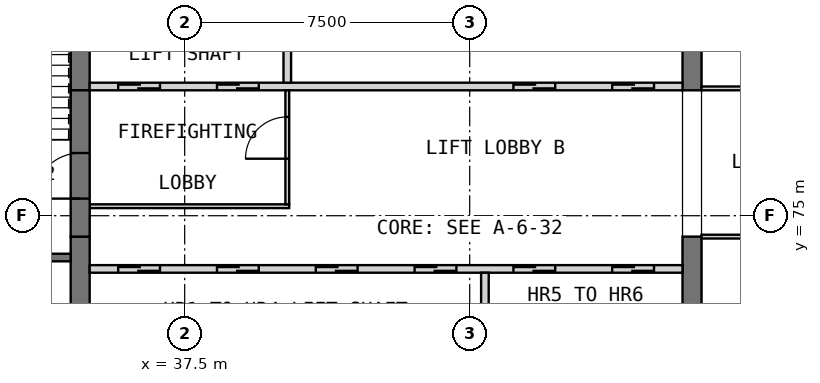
"""IFC4 building model, lengths in metres.
Left out: names, types, materials, properties, quantities, classifications, styles, units other than length and angle.
Written with IfcOpenShell. Run it as: python <this file> out.ifc"""

import sys

from ifc_helpers import new_model, si_unit, direction, frame, frame_2d, origin, place, context, subcontext, project, spatial, rectangle, extrude, element, fill, save


model = new_model("IFC4")
c1 = context("Model", 3, precision=1e-05, world=origin(), true_north=direction((0.0, 1.0)))
c2 = subcontext(c1, "Body", "Model", "MODEL_VIEW")
j1 = project(units=[si_unit("LENGTHUNIT", "METRE"), si_unit("PLANEANGLEUNIT", "RADIAN")], contexts=[c1])
p1 = place(None, origin())
s1 = spatial("IfcSite", under=j1, at=p1, CompositionType="ELEMENT")
p2 = place(p1, origin())
s2 = spatial("IfcBuilding", under=s1, at=p2, CompositionType="ELEMENT")
p3 = place(p2, frame((0.0, 0.0, 254.7)))
s3 = spatial("IfcBuildingStorey", under=s2, at=p3, CompositionType="ELEMENT", Elevation=254.7)
p4 = place(p3, frame((34.75, 68.05, 0.0), z_axis=(0.0, 0.0, 1.0), x_axis=(0.0, 1.0, 0.0)))
e1 = element("IfcWall", 1, at=p4, inside=s3, PredefinedType="SHEAR", context=c2, shape_type="SweptSolid", body=[
    extrude(rectangle(XDim=6.4, YDim=0.5, at=frame_2d((3.2, 0.0))), origin(), (0.0, 0.0, 1.0), 3.5),
])
p5 = place(p3, frame((34.75, 78.3, 0.0), z_axis=(0.0, 0.0, 1.0), x_axis=(0.0, 1.0, 0.0)))
e2 = element("IfcWall", 2, at=p5, inside=s3, PredefinedType="SHEAR", context=c2, shape_type="SweptSolid", body=[
    extrude(rectangle(XDim=3.6, YDim=0.5, at=frame_2d((1.8, 0.0))), origin(), (0.0, 0.0, 1.0), 3.5),
])
p6 = place(p3, frame((50.85, 68.05, 0.0), z_axis=(0.0, 0.0, 1.0), x_axis=(0.0, 1.0, 0.0)))
e3 = element("IfcWall", 3, at=p6, inside=s3, PredefinedType="SHEAR", context=c2, shape_type="SweptSolid", body=[
    extrude(rectangle(XDim=6.4, YDim=0.5, at=frame_2d((3.2, 0.0))), origin(), (0.0, 0.0, 1.0), 3.5),
])
p7 = place(p3, frame((50.85, 78.3, 0.0), z_axis=(0.0, 0.0, 1.0), x_axis=(0.0, 1.0, 0.0)))
e4 = element("IfcWall", 4, at=p7, inside=s3, PredefinedType="SHEAR", context=c2, shape_type="SweptSolid", body=[
    extrude(rectangle(XDim=3.6, YDim=0.5, at=frame_2d((1.8, 0.0))), origin(), (0.0, 0.0, 1.0), 3.5),
])
p8 = place(p3, frame((35.0, 73.6, 0.0), z_axis=(0.0, 0.0, 1.0), x_axis=(1.0, 0.0, 0.0)))
e5 = element("IfcWall", 5, at=p8, inside=s3, PredefinedType="SOLIDWALL", context=c2, shape_type="SweptSolid", body=[
    extrude(rectangle(XDim=15.6, YDim=0.2, at=frame_2d((7.8, 0.0))), origin(), (0.0, 0.0, 1.0), 3.5),
])
p9 = place(p8, frame((0.75, 0.0, 0.0)))
e6 = element("IfcOpeningElement", 6, at=p9, cuts=e5, PredefinedType="OPENING", context=c2, shape_type="SweptSolid", body=[
    extrude(rectangle(XDim=1.1, YDim=2.1, at=frame_2d((0.55, 1.05))), frame((0.0, 0.11, 0.0), z_axis=(0.0, -1.0, 0.0), x_axis=(1.0, 0.0, 0.0)), (0.0, 0.0, 1.0), 0.22),
])
p10 = place(p8, frame((3.35, 0.0, 0.0)))
e7 = element("IfcOpeningElement", 7, at=p10, cuts=e5, PredefinedType="OPENING", context=c2, shape_type="SweptSolid", body=[
    extrude(rectangle(XDim=1.1, YDim=2.1, at=frame_2d((0.55, 1.05))), frame((0.0, 0.11, 0.0), z_axis=(0.0, -1.0, 0.0), x_axis=(1.0, 0.0, 0.0)), (0.0, 0.0, 1.0), 0.22),
])
p11 = place(p8, frame((5.95, 0.0, 0.0)))
e8 = element("IfcOpeningElement", 8, at=p11, cuts=e5, PredefinedType="OPENING", context=c2, shape_type="SweptSolid", body=[
    extrude(rectangle(XDim=1.1, YDim=2.1, at=frame_2d((0.55, 1.05))), frame((0.0, 0.11, 0.0), z_axis=(0.0, -1.0, 0.0), x_axis=(1.0, 0.0, 0.0)), (0.0, 0.0, 1.0), 0.22),
])
p12 = place(p8, frame((8.55, 0.0, 0.0)))
e9 = element("IfcOpeningElement", 9, at=p12, cuts=e5, PredefinedType="OPENING", context=c2, shape_type="SweptSolid", body=[
    extrude(rectangle(XDim=1.1, YDim=2.1, at=frame_2d((0.55, 1.05))), frame((0.0, 0.11, 0.0), z_axis=(0.0, -1.0, 0.0), x_axis=(1.0, 0.0, 0.0)), (0.0, 0.0, 1.0), 0.22),
])
p13 = place(p8, frame((11.15, 0.0, 0.0)))
e10 = element("IfcOpeningElement", 10, at=p13, cuts=e5, PredefinedType="OPENING", context=c2, shape_type="SweptSolid", body=[
    extrude(rectangle(XDim=1.1, YDim=2.1, at=frame_2d((0.55, 1.05))), frame((0.0, 0.11, 0.0), z_axis=(0.0, -1.0, 0.0), x_axis=(1.0, 0.0, 0.0)), (0.0, 0.0, 1.0), 0.22),
])
p14 = place(p8, frame((13.75, 0.0, 0.0)))
e11 = element("IfcOpeningElement", 11, at=p14, cuts=e5, PredefinedType="OPENING", context=c2, shape_type="SweptSolid", body=[
    extrude(rectangle(XDim=1.1, YDim=2.1, at=frame_2d((0.55, 1.05))), frame((0.0, 0.11, 0.0), z_axis=(0.0, -1.0, 0.0), x_axis=(1.0, 0.0, 0.0)), (0.0, 0.0, 1.0), 0.22),
])
p15 = place(p3, frame((45.4, 71.5, 0.0), z_axis=(0.0, 0.0, 1.0), x_axis=(0.0, 1.0, 0.0)))
e12 = element("IfcWall", 12, at=p15, inside=s3, PredefinedType="SOLIDWALL", context=c2, shape_type="SweptSolid", body=[
    extrude(rectangle(XDim=2.0, YDim=0.2, at=frame_2d((1.0, 0.0))), origin(), (0.0, 0.0, 1.0), 3.5),
])
p16 = place(p3, frame((35.0, 78.4, 0.0), z_axis=(0.0, 0.0, 1.0), x_axis=(1.0, 0.0, 0.0)))
e13 = element("IfcWall", 13, at=p16, inside=s3, PredefinedType="SOLIDWALL", context=c2, shape_type="SweptSolid", body=[
    extrude(rectangle(XDim=15.6, YDim=0.2, at=frame_2d((7.8, 0.0))), origin(), (0.0, 0.0, 1.0), 3.5),
])
p17 = place(p16, frame((0.75, 0.0, 0.0)))
e14 = element("IfcOpeningElement", 14, at=p17, cuts=e13, PredefinedType="OPENING", context=c2, shape_type="SweptSolid", body=[
    extrude(rectangle(XDim=1.1, YDim=2.1, at=frame_2d((0.55, 1.05))), frame((0.0, 0.11, 0.0), z_axis=(0.0, -1.0, 0.0), x_axis=(1.0, 0.0, 0.0)), (0.0, 0.0, 1.0), 0.22),
])
p18 = place(p16, frame((3.35, 0.0, 0.0)))
e15 = element("IfcOpeningElement", 15, at=p18, cuts=e13, PredefinedType="OPENING", context=c2, shape_type="SweptSolid", body=[
    extrude(rectangle(XDim=1.1, YDim=2.1, at=frame_2d((0.55, 1.05))), frame((0.0, 0.11, 0.0), z_axis=(0.0, -1.0, 0.0), x_axis=(1.0, 0.0, 0.0)), (0.0, 0.0, 1.0), 0.22),
])
p19 = place(p16, frame((11.15, 0.0, 0.0)))
e16 = element("IfcOpeningElement", 16, at=p19, cuts=e13, PredefinedType="OPENING", context=c2, shape_type="SweptSolid", body=[
    extrude(rectangle(XDim=1.1, YDim=2.1, at=frame_2d((0.55, 1.05))), frame((0.0, 0.11, 0.0), z_axis=(0.0, -1.0, 0.0), x_axis=(1.0, 0.0, 0.0)), (0.0, 0.0, 1.0), 0.22),
])
p20 = place(p16, frame((13.75, 0.0, 0.0)))
e17 = element("IfcOpeningElement", 17, at=p20, cuts=e13, PredefinedType="OPENING", context=c2, shape_type="SweptSolid", body=[
    extrude(rectangle(XDim=1.1, YDim=2.1, at=frame_2d((0.55, 1.05))), frame((0.0, 0.11, 0.0), z_axis=(0.0, -1.0, 0.0), x_axis=(1.0, 0.0, 0.0)), (0.0, 0.0, 1.0), 0.22),
])
p21 = place(p3, frame((40.2, 78.5, 0.0), z_axis=(0.0, 0.0, 1.0), x_axis=(0.0, 1.0, 0.0)))
e18 = element("IfcWall", 18, at=p21, inside=s3, PredefinedType="SOLIDWALL", context=c2, shape_type="SweptSolid", body=[
    extrude(rectangle(XDim=3.4, YDim=0.2, at=frame_2d((1.7, 0.0))), origin(), (0.0, 0.0, 1.0), 3.5),
])
p22 = place(p3, frame((35.0, 75.25, 0.0), z_axis=(0.0, 0.0, 1.0), x_axis=(1.0, 0.0, 0.0)))
e19 = element("IfcWall", 19, at=p22, inside=s3, PredefinedType="PARTITIONING", context=c2, shape_type="SweptSolid", body=[
    extrude(rectangle(XDim=5.25, YDim=0.1, at=frame_2d((2.625, 0.0))), origin(), (0.0, 0.0, 1.0), 3.09),
])
p23 = place(p3, frame((40.2, 75.3, 0.0), z_axis=(0.0, 0.0, 1.0), x_axis=(0.0, 1.0, 0.0)))
e20 = element("IfcWall", 20, at=p23, inside=s3, PredefinedType="PARTITIONING", context=c2, shape_type="SweptSolid", body=[
    extrude(rectangle(XDim=3.0, YDim=0.1, at=frame_2d((1.5, 0.0))), origin(), (0.0, 0.0, 1.0), 3.09),
])
p24 = place(p23, frame((1.2, 0.0, 0.0)))
e21 = element("IfcOpeningElement", 21, at=p24, cuts=e20, PredefinedType="OPENING", context=c2, shape_type="SweptSolid", body=[
    extrude(rectangle(XDim=1.1, YDim=2.1, at=frame_2d((0.55, 1.05))), frame((0.0, 0.06, 0.0), z_axis=(0.0, -1.0, 0.0), x_axis=(1.0, 0.0, 0.0)), (0.0, 0.0, 1.0), 0.12),
])
p25 = place(p3, frame((34.75, 74.45, 0.0), z_axis=(0.0, 0.0, 1.0), x_axis=(0.0, 1.0, 0.0)))
e22 = element("IfcWall", 22, at=p25, inside=s3, PredefinedType="SOLIDWALL", context=c2, shape_type="SweptSolid", body=[
    extrude(rectangle(XDim=3.85, YDim=0.5, at=frame_2d((1.925, 0.0))), origin(), (0.0, 0.0, 1.0), 2.3),
])
p26 = place(p25, frame((1.0, 0.0, 0.0)))
e23 = element("IfcOpeningElement", 23, at=p26, cuts=e22, PredefinedType="OPENING", context=c2, shape_type="SweptSolid", body=[
    extrude(rectangle(XDim=1.2, YDim=2.1, at=frame_2d((0.6, 1.05))), frame((0.0, 0.26, 0.0), z_axis=(0.0, -1.0, 0.0), x_axis=(1.0, 0.0, 0.0)), (0.0, 0.0, 1.0), 0.52),
])
p27 = place(p3, frame((30.6, 73.9, 0.0), z_axis=(0.0, 0.0, 1.0), x_axis=(1.0, 0.0, 0.0)))
e24 = element("IfcWall", 24, at=p27, inside=s3, PredefinedType="SOLIDWALL", context=c2, shape_type="SweptSolid", body=[
    extrude(rectangle(XDim=3.9, YDim=0.2, at=frame_2d((1.95, 0.0))), origin(), (0.0, 0.0, 1.0), 3.09),
])
p28 = place(p27, frame((1.7, 0.0, 0.0)))
e25 = element("IfcOpeningElement", 25, at=p28, cuts=e24, PredefinedType="OPENING", context=c2, shape_type="SweptSolid", body=[
    extrude(rectangle(XDim=0.9, YDim=2.1, at=frame_2d((0.45, 1.05))), frame((0.0, 0.11, 0.0), z_axis=(0.0, -1.0, 0.0), x_axis=(1.0, 0.0, 0.0)), (0.0, 0.0, 1.0), 0.22),
])
p29 = place(p3, frame((51.1, 74.45, 0.0), z_axis=(0.0, 0.0, 1.0), x_axis=(1.0, 0.0, 0.0)))
e26 = element("IfcWall", 26, at=p29, inside=s3, PredefinedType="PARTITIONING", context=c2, shape_type="SweptSolid", body=[
    extrude(rectangle(XDim=8.3, YDim=0.1, at=frame_2d((4.15, 0.0))), origin(), (0.0, 0.0, 1.0), 3.09),
])
p30 = place(p29, frame((3.7, 0.0, 0.0)))
e27 = element("IfcOpeningElement", 27, at=p30, cuts=e26, PredefinedType="OPENING", context=c2, shape_type="SweptSolid", body=[
    extrude(rectangle(XDim=0.9, YDim=2.1, at=frame_2d((0.45, 1.05))), frame((0.0, 0.06, 0.0), z_axis=(0.0, -1.0, 0.0), x_axis=(1.0, 0.0, 0.0)), (0.0, 0.0, 1.0), 0.12),
])
p31 = place(p3, frame((51.1, 78.35, 0.0), z_axis=(0.0, 0.0, 1.0), x_axis=(1.0, 0.0, 0.0)))
e28 = element("IfcWall", 28, at=p31, inside=s3, PredefinedType="PARTITIONING", context=c2, shape_type="SweptSolid", body=[
    extrude(rectangle(XDim=8.3, YDim=0.1, at=frame_2d((4.15, 0.0))), origin(), (0.0, 0.0, 1.0), 3.09),
])
p32 = place(p31, frame((3.7, 0.0, 0.0)))
e29 = element("IfcOpeningElement", 29, at=p32, cuts=e28, PredefinedType="OPENING", context=c2, shape_type="SweptSolid", body=[
    extrude(rectangle(XDim=0.9, YDim=2.1, at=frame_2d((0.45, 1.05))), frame((0.0, 0.06, 0.0), z_axis=(0.0, -1.0, 0.0), x_axis=(1.0, 0.0, 0.0)), (0.0, 0.0, 1.0), 0.12),
])
p33 = place(p9, origin())
e30 = element("IfcDoor", 30, at=p33, inside=s3, OperationType="DOUBLE_DOOR_SLIDING", PredefinedType="DOOR", context=c2, shape_type="SweptSolid", body=[
    extrude(rectangle(XDim=1.1, YDim=2.1, at=frame_2d((0.55, 1.05))), frame((0.0, 0.025, 0.0), z_axis=(0.0, -1.0, 0.0), x_axis=(1.0, 0.0, 0.0)), (0.0, 0.0, 1.0), 0.05),
])
fill(e6, e30)
p34 = place(p10, origin())
e31 = element("IfcDoor", 31, at=p34, inside=s3, OperationType="DOUBLE_DOOR_SLIDING", PredefinedType="DOOR", context=c2, shape_type="SweptSolid", body=[
    extrude(rectangle(XDim=1.1, YDim=2.1, at=frame_2d((0.55, 1.05))), frame((0.0, 0.025, 0.0), z_axis=(0.0, -1.0, 0.0), x_axis=(1.0, 0.0, 0.0)), (0.0, 0.0, 1.0), 0.05),
])
fill(e7, e31)
p35 = place(p11, origin())
e32 = element("IfcDoor", 32, at=p35, inside=s3, OperationType="DOUBLE_DOOR_SLIDING", PredefinedType="DOOR", context=c2, shape_type="SweptSolid", body=[
    extrude(rectangle(XDim=1.1, YDim=2.1, at=frame_2d((0.55, 1.05))), frame((0.0, 0.025, 0.0), z_axis=(0.0, -1.0, 0.0), x_axis=(1.0, 0.0, 0.0)), (0.0, 0.0, 1.0), 0.05),
])
fill(e8, e32)
p36 = place(p12, origin())
e33 = element("IfcDoor", 33, at=p36, inside=s3, OperationType="DOUBLE_DOOR_SLIDING", PredefinedType="DOOR", context=c2, shape_type="SweptSolid", body=[
    extrude(rectangle(XDim=1.1, YDim=2.1, at=frame_2d((0.55, 1.05))), frame((0.0, 0.025, 0.0), z_axis=(0.0, -1.0, 0.0), x_axis=(1.0, 0.0, 0.0)), (0.0, 0.0, 1.0), 0.05),
])
fill(e9, e33)
p37 = place(p13, origin())
e34 = element("IfcDoor", 34, at=p37, inside=s3, OperationType="DOUBLE_DOOR_SLIDING", PredefinedType="DOOR", context=c2, shape_type="SweptSolid", body=[
    extrude(rectangle(XDim=1.1, YDim=2.1, at=frame_2d((0.55, 1.05))), frame((0.0, 0.025, 0.0), z_axis=(0.0, -1.0, 0.0), x_axis=(1.0, 0.0, 0.0)), (0.0, 0.0, 1.0), 0.05),
])
fill(e10, e34)
p38 = place(p14, origin())
e35 = element("IfcDoor", 35, at=p38, inside=s3, OperationType="DOUBLE_DOOR_SLIDING", PredefinedType="DOOR", context=c2, shape_type="SweptSolid", body=[
    extrude(rectangle(XDim=1.1, YDim=2.1, at=frame_2d((0.55, 1.05))), frame((0.0, 0.025, 0.0), z_axis=(0.0, -1.0, 0.0), x_axis=(1.0, 0.0, 0.0)), (0.0, 0.0, 1.0), 0.05),
])
fill(e11, e35)
p39 = place(p17, origin())
e36 = element("IfcDoor", 36, at=p39, inside=s3, OperationType="DOUBLE_DOOR_SLIDING", PredefinedType="DOOR", context=c2, shape_type="SweptSolid", body=[
    extrude(rectangle(XDim=1.1, YDim=2.1, at=frame_2d((0.55, 1.05))), frame((0.0, 0.025, 0.0), z_axis=(0.0, -1.0, 0.0), x_axis=(1.0, 0.0, 0.0)), (0.0, 0.0, 1.0), 0.05),
])
fill(e14, e36)
p40 = place(p18, origin())
e37 = element("IfcDoor", 37, at=p40, inside=s3, OperationType="DOUBLE_DOOR_SLIDING", PredefinedType="DOOR", context=c2, shape_type="SweptSolid", body=[
    extrude(rectangle(XDim=1.1, YDim=2.1, at=frame_2d((0.55, 1.05))), frame((0.0, 0.025, 0.0), z_axis=(0.0, -1.0, 0.0), x_axis=(1.0, 0.0, 0.0)), (0.0, 0.0, 1.0), 0.05),
])
fill(e15, e37)
p41 = place(p19, origin())
e38 = element("IfcDoor", 38, at=p41, inside=s3, OperationType="DOUBLE_DOOR_SLIDING", PredefinedType="DOOR", context=c2, shape_type="SweptSolid", body=[
    extrude(rectangle(XDim=1.1, YDim=2.1, at=frame_2d((0.55, 1.05))), frame((0.0, 0.025, 0.0), z_axis=(0.0, -1.0, 0.0), x_axis=(1.0, 0.0, 0.0)), (0.0, 0.0, 1.0), 0.05),
])
fill(e16, e38)
p42 = place(p20, origin())
e39 = element("IfcDoor", 39, at=p42, inside=s3, OperationType="DOUBLE_DOOR_SLIDING", PredefinedType="DOOR", context=c2, shape_type="SweptSolid", body=[
    extrude(rectangle(XDim=1.1, YDim=2.1, at=frame_2d((0.55, 1.05))), frame((0.0, 0.025, 0.0), z_axis=(0.0, -1.0, 0.0), x_axis=(1.0, 0.0, 0.0)), (0.0, 0.0, 1.0), 0.05),
])
fill(e17, e39)
p43 = place(p24, origin())
e40 = element("IfcDoor", 40, at=p43, inside=s3, OperationType="SINGLE_SWING_LEFT", PredefinedType="DOOR", context=c2, shape_type="SweptSolid", body=[
    extrude(rectangle(XDim=1.1, YDim=2.1, at=frame_2d((0.55, 1.05))), frame((0.0, 0.025, 0.0), z_axis=(0.0, -1.0, 0.0), x_axis=(1.0, 0.0, 0.0)), (0.0, 0.0, 1.0), 0.05),
])
fill(e21, e40)
p44 = place(p26, origin())
e41 = element("IfcDoor", 41, at=p44, inside=s3, OperationType="SINGLE_SWING_RIGHT", PredefinedType="DOOR", context=c2, shape_type="SweptSolid", body=[
    extrude(rectangle(XDim=1.2, YDim=2.1, at=frame_2d((0.6, 1.05))), frame((0.0, 0.025, 0.0), z_axis=(0.0, -1.0, 0.0), x_axis=(1.0, 0.0, 0.0)), (0.0, 0.0, 1.0), 0.05),
])
fill(e23, e41)
save(model, sys.argv[1])
